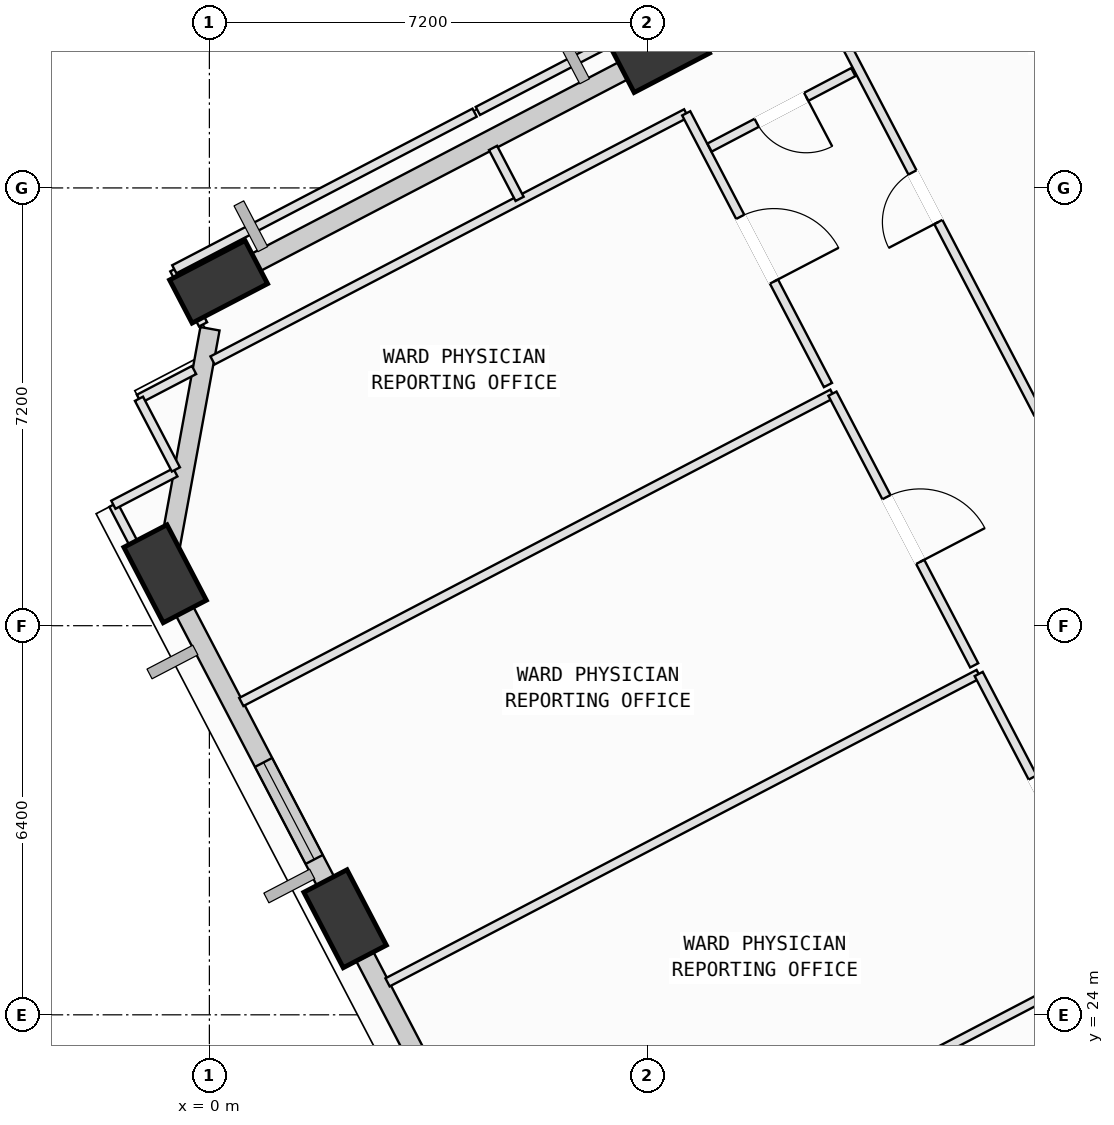
"""IFC4 building model, lengths in metres.
Left out: names, types, materials, properties, quantities, classifications, styles, units other than length and angle.
Written with IfcOpenShell. Run it as: python <this file> out.ifc"""

import sys

from ifc_helpers import new_model, si_unit, direction, frame, frame_2d, origin, origin_2d, place, context, subcontext, project, spatial, rectangle, extrude, element, fill, save


model = new_model("IFC4")
c1 = context("Model", 3, precision=1e-05, world=origin(), true_north=direction((0.0, 1.0)))
c2 = subcontext(c1, "Body", "Model", "MODEL_VIEW")
j1 = project(units=[si_unit("LENGTHUNIT", "METRE"), si_unit("PLANEANGLEUNIT", "RADIAN")], contexts=[c1])
p1 = place(None, origin())
s1 = spatial("IfcSite", under=j1, at=p1, CompositionType="ELEMENT")
p2 = place(p1, origin())
s2 = spatial("IfcBuilding", under=s1, at=p2, CompositionType="ELEMENT")
p3 = place(p2, frame((0.0, 0.0, 140.4)))
s3 = spatial("IfcBuildingStorey", under=s2, at=p3, CompositionType="ELEMENT", Elevation=140.4)
p4 = place(p3, frame((7.421, 39.848, 0.002), z_axis=(-0.06100607157, -0.108138681178, 0.992262205702), x_axis=(0.9977035928, -0.035912424695, 0.057426811397)))
e1 = element("IfcColumn", 1, at=p4, inside=s3, PredefinedType="COLUMN", context=c2, shape_type="SweptSolid", body=[
    extrude(rectangle(XDim=1.4, YDim=0.8, at=origin_2d()), origin(), (0.0, 0.0, 1.0), 3.942),
])
p5 = place(p3, frame((0.151, 36.055, 0.002), z_axis=(-0.044998626594, -0.137537124536, 0.98947393244), x_axis=(0.984963379372, 0.15927090935, 0.066932195018)))
e2 = element("IfcColumn", 2, at=p5, inside=s3, PredefinedType="COLUMN", context=c2, shape_type="SweptSolid", body=[
    extrude(rectangle(XDim=1.4, YDim=0.8, at=origin_2d()), origin(), (0.0, 0.0, 1.0), 3.939),
])
p6 = place(p3, frame((-0.728, 31.254, 0.002), z_axis=(-0.025282213197, -0.141044859338, 0.98968033089), x_axis=(-0.300450006372, 0.945298620411, 0.127044527317)))
e3 = element("IfcColumn", 3, at=p6, inside=s3, PredefinedType="COLUMN", context=c2, shape_type="SweptSolid", body=[
    extrude(rectangle(XDim=1.4, YDim=0.8, at=origin_2d()), origin(), (0.0, 0.0, 1.0), 3.921),
])
p7 = place(p3, frame((2.232, 25.58, 0.002), z_axis=(-0.00211503443, -0.129017100255, 0.991640113384), x_axis=(-0.448049256138, 0.886658806791, 0.114402903869)))
e4 = element("IfcColumn", 4, at=p7, inside=s3, PredefinedType="COLUMN", context=c2, shape_type="SweptSolid", body=[
    extrude(rectangle(XDim=1.4, YDim=0.8, at=origin_2d()), origin(), (0.0, 0.0, 1.0), 3.925),
])
p8 = place(p3, frame((7.658, 39.972, 0.0), z_axis=(0.0, 0.0, 1.0), x_axis=(0.886603508344, 0.462530235759, 0.0)))
e5 = element("IfcWall", 5, at=p8, inside=s3, PredefinedType="SOLIDWALL", context=c2, shape_type="SweptSolid", body=[
    extrude(rectangle(XDim=7.231, YDim=0.32, at=frame_2d((3.615, 0.0))), origin(), (0.0, 0.0, 1.0), 3.085),
])
p9 = place(p3, frame((0.367, 36.168, 0.0), z_axis=(0.0, 0.0, 1.0), x_axis=(0.886598018627, 0.4625407586, 0.0)))
e6 = element("IfcWall", 6, at=p9, inside=s3, PredefinedType="SOLIDWALL", context=c2, shape_type="SweptSolid", body=[
    extrude(rectangle(XDim=7.27, YDim=0.32, at=frame_2d((3.635, 0.0))), origin(), (0.0, 0.0, 1.0), 3.085),
])
p10 = place(p3, frame((-0.691, 31.458, 0.0), z_axis=(0.0, 0.0, 1.0), x_axis=(0.180144672385, 0.983640125763, 0.0)))
e7 = element("IfcWall", 7, at=p10, inside=s3, PredefinedType="SOLIDWALL", context=c2, shape_type="SweptSolid", body=[
    extrude(rectangle(XDim=3.89, YDim=0.32, at=frame_2d((1.945, 0.0))), origin(), (0.0, 0.0, 1.0), 3.085),
])
p11 = place(p3, frame((2.116, 25.803, 0.0), z_axis=(0.0, 0.0, 1.0), x_axis=(-0.462506359197, 0.886615964046, 0.0)))
e8 = element("IfcWall", 8, at=p11, inside=s3, PredefinedType="SOLIDWALL", context=c2, shape_type="SweptSolid", body=[
    extrude(rectangle(XDim=5.456, YDim=0.32, at=frame_2d((2.728, 0.0))), origin(), (0.0, 0.0, 1.0), 3.085),
])
p12 = place(p11, frame((0.848, 0.0, 0.75)))
e9 = element("IfcOpeningElement", 9, at=p12, cuts=e8, PredefinedType="OPENING", context=c2, shape_type="SweptSolid", body=[
    extrude(rectangle(XDim=1.8, YDim=2.05, at=frame_2d((0.9, 1.025))), frame((0.0, 0.17, 0.0), z_axis=(0.0, -1.0, 0.0), x_axis=(1.0, 0.0, 0.0)), (0.0, 0.0, 1.0), 0.34),
])
p13 = place(p3, frame((5.163, 19.962, 0.0), z_axis=(0.0, 0.0, 1.0), x_axis=(-0.462505217962, 0.886616559375, 0.0)))
e10 = element("IfcWall", 10, at=p13, inside=s3, PredefinedType="SOLIDWALL", context=c2, shape_type="SweptSolid", body=[
    extrude(rectangle(XDim=5.628, YDim=0.32, at=frame_2d((2.814, 0.0))), origin(), (0.0, 0.0, 1.0), 3.085),
])
p14 = place(p13, frame((1.967, 0.0, 0.75)))
e11 = element("IfcOpeningElement", 11, at=p14, cuts=e10, PredefinedType="OPENING", context=c2, shape_type="SweptSolid", body=[
    extrude(rectangle(XDim=1.2, YDim=1.75, at=frame_2d((0.6, 0.875))), frame((0.0, 0.17, 0.0), z_axis=(0.0, -1.0, 0.0), x_axis=(1.0, 0.0, 0.0)), (0.0, 0.0, 1.0), 0.34),
])
p15 = place(p3, frame((5.28, 19.895, 0.0), z_axis=(0.0, 0.0, 1.0), x_axis=(0.886580898603, 0.462573572777, 0.0)))
e12 = element("IfcWall", 12, at=p15, inside=s3, PredefinedType="PARTITIONING", context=c2, shape_type="SweptSolid", body=[
    extrude(rectangle(XDim=11.028, YDim=0.15, at=frame_2d((5.514, 0.0))), origin(), (0.0, 0.0, 1.0), 3.7),
])
p16 = place(p3, frame((2.93, 24.534, 0.0), z_axis=(0.0, 0.0, 1.0), x_axis=(0.886600327973, 0.462536332019, 0.0)))
e13 = element("IfcWall", 13, at=p16, inside=s3, PredefinedType="PARTITIONING", context=c2, shape_type="SweptSolid", body=[
    extrude(rectangle(XDim=10.966, YDim=0.15, at=frame_2d((5.483, 0.0))), origin(), (0.0, 0.0, 1.0), 3.285),
])
p17 = place(p3, frame((12.652, 29.606, 0.0), z_axis=(0.0, 0.0, 1.0), x_axis=(0.462435226927, -0.886653066817, 0.0)))
e14 = element("IfcWall", 14, at=p17, inside=s3, PredefinedType="PARTITIONING", context=c2, shape_type="SweptSolid", body=[
    extrude(rectangle(XDim=5.04, YDim=0.15, at=frame_2d((2.52, 0.0))), origin(), (0.0, 0.0, 1.0), 3.7),
])
p18 = place(p17, frame((1.92, 0.0, 0.0)))
e15 = element("IfcOpeningElement", 15, at=p18, cuts=e14, PredefinedType="OPENING", context=c2, shape_type="SweptSolid", body=[
    extrude(rectangle(XDim=1.2, YDim=2.15, at=frame_2d((0.6, 1.075))), frame((0.0, 0.085, 0.0), z_axis=(0.0, -1.0, 0.0), x_axis=(1.0, 0.0, 0.0)), (0.0, 0.0, 1.0), 0.17),
])
p19 = place(p3, frame((0.525, 29.145, 0.0), z_axis=(0.0, 0.0, 1.0), x_axis=(0.886636847368, 0.462466324059, 0.0)))
e16 = element("IfcWall", 16, at=p19, inside=s3, PredefinedType="PARTITIONING", context=c2, shape_type="SweptSolid", body=[
    extrude(rectangle(XDim=10.965, YDim=0.15, at=frame_2d((5.483, 0.0))), origin(), (0.0, 0.0, 1.0), 3.7),
])
p20 = place(p3, frame((10.247, 34.216, 0.0), z_axis=(0.0, 0.0, 1.0), x_axis=(0.462514680435, -0.886611623194, 0.0)))
e17 = element("IfcWall", 17, at=p20, inside=s3, PredefinedType="PARTITIONING", context=c2, shape_type="SweptSolid", body=[
    extrude(rectangle(XDim=5.04, YDim=0.15, at=frame_2d((2.52, 0.0))), origin(), (0.0, 0.0, 1.0), 3.7),
])
p21 = place(p20, frame((1.92, 0.0, 0.0)))
e18 = element("IfcOpeningElement", 18, at=p21, cuts=e17, PredefinedType="OPENING", context=c2, shape_type="SweptSolid", body=[
    extrude(rectangle(XDim=1.2, YDim=2.15, at=frame_2d((0.6, 1.075))), frame((0.0, 0.085, 0.0), z_axis=(0.0, -1.0, 0.0), x_axis=(1.0, 0.0, 0.0)), (0.0, 0.0, 1.0), 0.17),
])
p22 = place(p3, frame((2.357, 24.845, 0.0), z_axis=(0.0, 0.0, 1.0), x_axis=(-0.462791687413, 0.886467063157, 0.0)))
e19 = element("IfcWall", 19, at=p22, inside=s3, PredefinedType="PARTITIONING", context=c2, shape_type="SweptSolid", body=[
    extrude(rectangle(XDim=0.961, YDim=0.15, at=frame_2d((0.48, 0.0))), origin(), (0.0, 0.0, 1.0), 3.085),
])
p23 = place(p3, frame((-1.158, 34.132, 0.0), z_axis=(0.0, 0.0, 1.0), x_axis=(0.886503902607, 0.462721115427, 0.0)))
e20 = element("IfcWall", 20, at=p23, inside=s3, PredefinedType="PARTITIONING", context=c2, shape_type="SweptSolid", body=[
    extrude(rectangle(XDim=1.022, YDim=0.15, at=frame_2d((0.511, 0.0))), origin(), (0.0, 0.0, 1.0), 3.7),
])
p24 = place(p3, frame((0.052, 34.763, 0.0), z_axis=(0.0, 0.0, 1.0), x_axis=(0.88660367237, 0.462529921345, 0.0)))
e21 = element("IfcWall", 21, at=p24, inside=s3, PredefinedType="PARTITIONING", context=c2, shape_type="SweptSolid", body=[
    extrude(rectangle(XDim=8.786, YDim=0.15, at=frame_2d((4.393, 0.0))), origin(), (0.0, 0.0, 1.0), 3.7),
])
p25 = place(p3, frame((7.842, 38.827, 0.0), z_axis=(0.0, 0.0, 1.0), x_axis=(0.462473305165, -0.886633206016, 0.0)))
e22 = element("IfcWall", 22, at=p25, inside=s3, PredefinedType="PARTITIONING", context=c2, shape_type="SweptSolid", body=[
    extrude(rectangle(XDim=5.041, YDim=0.15, at=frame_2d((2.52, 0.0))), origin(), (0.0, 0.0, 1.0), 2.885),
])
p26 = place(p25, frame((1.92, 0.0, 0.0)))
e23 = element("IfcOpeningElement", 23, at=p26, cuts=e22, PredefinedType="OPENING", context=c2, shape_type="SweptSolid", body=[
    extrude(rectangle(XDim=1.2, YDim=2.15, at=frame_2d((0.6, 1.075))), frame((0.0, 0.085, 0.0), z_axis=(0.0, -1.0, 0.0), x_axis=(1.0, 0.0, 0.0)), (0.0, 0.0, 1.0), 0.17),
])
p27 = place(p3, frame((-0.612, 30.534, 0.0), z_axis=(0.0, 0.0, 1.0), x_axis=(-0.462274822208, 0.886736707683, 0.0)))
e24 = element("IfcWall", 24, at=p27, inside=s3, PredefinedType="PARTITIONING", context=c2, shape_type="SweptSolid", body=[
    extrude(rectangle(XDim=2.092, YDim=0.15, at=frame_2d((1.046, 0.0))), origin(), (0.0, 0.0, 1.0), 3.085),
])
p28 = place(p3, frame((-1.579, 32.389, 0.0), z_axis=(0.0, 0.0, 1.0), x_axis=(0.886475001991, 0.462776480436, 0.0)))
e25 = element("IfcWall", 25, at=p28, inside=s3, PredefinedType="PARTITIONING", context=c2, shape_type="SweptSolid", body=[
    extrude(rectangle(XDim=1.15, YDim=0.15, at=frame_2d((0.575, 0.0))), origin(), (0.0, 0.0, 1.0), 3.7),
])
p29 = place(p3, frame((-0.551, 32.97, 0.0), z_axis=(0.0, 0.0, 1.0), x_axis=(-0.462935079939, 0.886392188459, 0.0)))
e26 = element("IfcWall", 26, at=p29, inside=s3, PredefinedType="PARTITIONING", context=c2, shape_type="SweptSolid", body=[
    extrude(rectangle(XDim=1.311, YDim=0.15, at=frame_2d((0.656, 0.0))), origin(), (0.0, 0.0, 1.0), 3.7),
])
p30 = place(p3, frame((13.629, 33.894, 0.0), z_axis=(0.0, 0.0, 1.0), x_axis=(-0.462450459837, 0.886645121904, 0.0)))
e27 = element("IfcWall", 27, at=p30, inside=s3, PredefinedType="PARTITIONING", context=c2, shape_type="SweptSolid", body=[
    extrude(rectangle(XDim=8.016, YDim=0.15, at=frame_2d((4.008, 0.0))), origin(), (0.0, 0.0, 1.0), 3.7),
])
p31 = place(p30, frame((3.548, 0.0, 0.0)))
e28 = element("IfcOpeningElement", 28, at=p31, cuts=e27, PredefinedType="OPENING", context=c2, shape_type="SweptSolid", body=[
    extrude(rectangle(XDim=0.92, YDim=2.1, at=frame_2d((0.46, 1.05))), frame((0.0, 0.085, 0.0), z_axis=(0.0, -1.0, 0.0), x_axis=(1.0, 0.0, 0.0)), (0.0, 0.0, 1.0), 0.17),
])
p32 = place(p3, frame((4.665, 38.258, 0.0), z_axis=(0.0, 0.0, 1.0), x_axis=(0.462336486669, -0.886704557953, 0.0)))
e29 = element("IfcWall", 29, at=p32, inside=s3, PredefinedType="PARTITIONING", context=c2, shape_type="SweptSolid", body=[
    extrude(rectangle(XDim=0.945, YDim=0.15, at=frame_2d((0.473, 0.0))), origin(), (0.0, 0.0, 1.0), 3.7),
])
p33 = place(p3, frame((-0.104, 35.356, 0.0), z_axis=(0.0, 0.0, 1.0), x_axis=(-0.462721115427, 0.886503902607, 0.0)))
e30 = element("IfcWall", 30, at=p33, inside=s3, PredefinedType="PARTITIONING", context=c2, shape_type="SweptSolid", body=[
    extrude(rectangle(XDim=1.022, YDim=0.15, at=frame_2d((0.511, 0.0))), origin(), (0.0, 0.0, 1.0), 2.885),
])
p34 = place(p3, frame((-0.577, 36.262, 0.0), z_axis=(0.0, 0.0, 1.0), x_axis=(0.886652826293, 0.462435688098, 0.0)))
e31 = element("IfcWall", 31, at=p34, inside=s3, PredefinedType="PARTITIONING", context=c2, shape_type="SweptSolid", body=[
    extrude(rectangle(XDim=5.57, YDim=0.15, at=frame_2d((2.785, 0.0))), origin(), (0.0, 0.0, 1.0), 3.7),
])
p35 = place(p3, frame((4.415, 38.866, 0.0), z_axis=(0.0, 0.0, 1.0), x_axis=(0.886603833565, 0.462529612359, 0.0)))
e32 = element("IfcWall", 32, at=p35, inside=s3, PredefinedType="PARTITIONING", context=c2, shape_type="SweptSolid", body=[
    extrude(rectangle(XDim=6.19, YDim=0.15, at=frame_2d((3.095, 0.0))), origin(), (0.0, 0.0, 1.0), 3.7),
])
p36 = place(p3, frame((10.59, 39.505, 0.0), z_axis=(0.0, 0.0, 1.0), x_axis=(-0.885419541183, -0.464792680764, 0.0)))
e33 = element("IfcWall", 33, at=p36, inside=s3, PredefinedType="PARTITIONING", context=c2, shape_type="SweptSolid", body=[
    extrude(rectangle(XDim=2.67, YDim=0.15, at=frame_2d((1.335, 0.0))), origin(), (0.0, 0.0, 1.0), 3.7),
])
p37 = place(p36, frame((0.875, 0.0, 0.0)))
e34 = element("IfcOpeningElement", 34, at=p37, cuts=e33, PredefinedType="OPENING", context=c2, shape_type="SweptSolid", body=[
    extrude(rectangle(XDim=0.92, YDim=2.1, at=frame_2d((0.46, 1.05))), frame((0.0, 0.085, 0.0), z_axis=(0.0, -1.0, 0.0), x_axis=(1.0, 0.0, 0.0)), (0.0, 0.0, 1.0), 0.17),
])
p38 = place(p12, origin())
e35 = element("IfcWindow", 35, at=p38, inside=s3, PartitioningType="SINGLE_PANEL", PredefinedType="WINDOW", context=c2, shape_type="SweptSolid", body=[
    extrude(rectangle(XDim=1.8, YDim=2.05, at=frame_2d((0.9, 1.025))), frame((0.0, 0.03, 0.0), z_axis=(0.0, -1.0, 0.0), x_axis=(1.0, 0.0, 0.0)), (0.0, 0.0, 1.0), 0.06),
])
fill(e9, e35)
p39 = place(p18, origin())
e36 = element("IfcDoor", 36, at=p39, inside=s3, OperationType="SINGLE_SWING_RIGHT", PredefinedType="DOOR", context=c2, shape_type="SweptSolid", body=[
    extrude(rectangle(XDim=1.2, YDim=2.15, at=frame_2d((0.6, 1.075))), frame((0.0, 0.025, 0.0), z_axis=(0.0, -1.0, 0.0), x_axis=(1.0, 0.0, 0.0)), (0.0, 0.0, 1.0), 0.05),
])
fill(e15, e36)
p40 = place(p21, origin())
e37 = element("IfcDoor", 37, at=p40, inside=s3, OperationType="SINGLE_SWING_RIGHT", PredefinedType="DOOR", context=c2, shape_type="SweptSolid", body=[
    extrude(rectangle(XDim=1.2, YDim=2.15, at=frame_2d((0.6, 1.075))), frame((0.0, 0.025, 0.0), z_axis=(0.0, -1.0, 0.0), x_axis=(1.0, 0.0, 0.0)), (0.0, 0.0, 1.0), 0.05),
])
fill(e18, e37)
p41 = place(p26, origin())
e38 = element("IfcDoor", 38, at=p41, inside=s3, OperationType="SINGLE_SWING_RIGHT", PredefinedType="DOOR", context=c2, shape_type="SweptSolid", body=[
    extrude(rectangle(XDim=1.2, YDim=2.15, at=frame_2d((0.6, 1.075))), frame((0.0, 0.025, 0.0), z_axis=(0.0, -1.0, 0.0), x_axis=(1.0, 0.0, 0.0)), (0.0, 0.0, 1.0), 0.05),
])
fill(e23, e38)
p42 = place(p31, origin())
e39 = element("IfcDoor", 39, at=p42, inside=s3, OperationType="SINGLE_SWING_LEFT", PredefinedType="DOOR", context=c2, shape_type="SweptSolid", body=[
    extrude(rectangle(XDim=0.92, YDim=2.1, at=frame_2d((0.46, 1.05))), frame((0.0, 0.025, 0.0), z_axis=(0.0, -1.0, 0.0), x_axis=(1.0, 0.0, 0.0)), (0.0, 0.0, 1.0), 0.05),
])
fill(e28, e39)
p43 = place(p37, origin())
e40 = element("IfcDoor", 40, at=p43, inside=s3, OperationType="SINGLE_SWING_LEFT", PredefinedType="DOOR", context=c2, shape_type="SweptSolid", body=[
    extrude(rectangle(XDim=0.92, YDim=2.1, at=frame_2d((0.46, 1.05))), frame((0.0, 0.025, 0.0), z_axis=(0.0, -1.0, 0.0), x_axis=(1.0, 0.0, 0.0)), (0.0, 0.0, 1.0), 0.05),
])
fill(e34, e40)
save(model, sys.argv[1])
